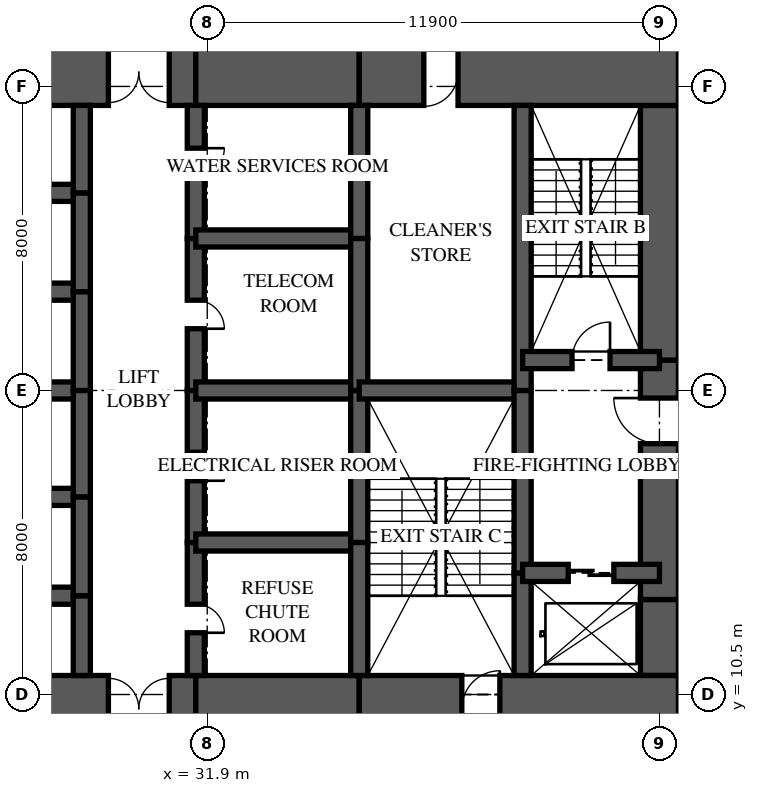
"""IFC4 building model, lengths in metres.
Left out: names, types, materials, properties, quantities, classifications, styles, units other than length and angle.
Written with IfcOpenShell. Run it as: python <this file> out.ifc"""

import sys

from ifc_helpers import new_model, si_unit, direction, frame, frame_2d, origin, place, context, subcontext, project, spatial, rectangle, extrude, element, fill, save


model = new_model("IFC4")
c1 = context("Model", 3, precision=1e-05, world=origin(), true_north=direction((0.0, 1.0)))
c2 = subcontext(c1, "Body", "Model", "MODEL_VIEW")
j1 = project(units=[si_unit("LENGTHUNIT", "METRE"), si_unit("PLANEANGLEUNIT", "RADIAN")], contexts=[c1])
p1 = place(None, origin())
s1 = spatial("IfcSite", under=j1, at=p1, CompositionType="ELEMENT")
p2 = place(p1, origin())
s2 = spatial("IfcBuilding", under=s1, at=p2, CompositionType="ELEMENT")
p3 = place(p2, frame((0.0, 0.0, -4.0)))
s3 = spatial("IfcBuildingStorey", under=s2, at=p3, CompositionType="ELEMENT", Elevation=-4.0)
p4 = place(p3, frame((26.0, 10.125, 0.0), z_axis=(0.0, 0.0, 1.0), x_axis=(1.0, 0.0, 0.0)))
e1 = element("IfcWall", 1, at=p4, inside=s3, PredefinedType="SHEAR", context=c2, shape_type="SweptSolid", body=[
    extrude(rectangle(XDim=5.6, YDim=1.75, at=frame_2d((2.8, 0.0))), origin(), (0.0, 0.0, 1.0), 4.0),
])
p5 = place(p4, frame((3.3, 0.0, 0.0)))
e2 = element("IfcOpeningElement", 2, at=p5, cuts=e1, PredefinedType="OPENING", context=c2, shape_type="SweptSolid", body=[
    extrude(rectangle(XDim=1.6, YDim=2.1, at=frame_2d((0.8, 1.05))), frame((0.0, 0.885, 0.0), z_axis=(0.0, -1.0, 0.0), x_axis=(1.0, 0.0, 0.0)), (0.0, 0.0, 1.0), 1.77),
])
p6 = place(p3, frame((31.6, 10.125, 0.0), z_axis=(0.0, 0.0, 1.0), x_axis=(1.0, 0.0, 0.0)))
e3 = element("IfcWall", 3, at=p6, inside=s3, PredefinedType="SHEAR", context=c2, shape_type="SweptSolid", body=[
    extrude(rectangle(XDim=4.3, YDim=1.75, at=frame_2d((2.15, 0.0))), origin(), (0.0, 0.0, 1.0), 4.0),
])
p7 = place(p3, frame((35.9, 10.125, 0.0), z_axis=(0.0, 0.0, 1.0), x_axis=(1.0, 0.0, 0.0)))
e4 = element("IfcWall", 4, at=p7, inside=s3, PredefinedType="SHEAR", context=c2, shape_type="SweptSolid", body=[
    extrude(rectangle(XDim=8.4, YDim=1.75, at=frame_2d((4.2, 0.0))), origin(), (0.0, 0.0, 1.0), 4.0),
])
p8 = place(p7, frame((2.7, 0.0, 0.0)))
e5 = element("IfcOpeningElement", 5, at=p8, cuts=e4, PredefinedType="OPENING", context=c2, shape_type="SweptSolid", body=[
    extrude(rectangle(XDim=1.0, YDim=2.1, at=frame_2d((0.5, 1.05))), frame((0.0, 0.885, 0.0), z_axis=(0.0, -1.0, 0.0), x_axis=(1.0, 0.0, 0.0)), (0.0, 0.0, 1.0), 1.77),
])
p9 = place(p3, frame((44.3, 26.875, 0.0), z_axis=(0.0, 0.0, 1.0), x_axis=(-1.0, 0.0, 0.0)))
e6 = element("IfcWall", 6, at=p9, inside=s3, PredefinedType="SHEAR", context=c2, shape_type="SweptSolid", body=[
    extrude(rectangle(XDim=8.4, YDim=1.75, at=frame_2d((4.2, 0.0))), origin(), (0.0, 0.0, 1.0), 4.0),
])
p10 = place(p9, frame((5.8, 0.0, 0.0)))
e7 = element("IfcOpeningElement", 7, at=p10, cuts=e6, PredefinedType="OPENING", context=c2, shape_type="SweptSolid", body=[
    extrude(rectangle(XDim=0.9, YDim=2.1, at=frame_2d((0.45, 1.05))), frame((0.0, 0.885, 0.0), z_axis=(0.0, -1.0, 0.0), x_axis=(1.0, 0.0, 0.0)), (0.0, 0.0, 1.0), 1.77),
])
p11 = place(p3, frame((35.9, 26.875, 0.0), z_axis=(0.0, 0.0, 1.0), x_axis=(-1.0, 0.0, 0.0)))
e8 = element("IfcWall", 8, at=p11, inside=s3, PredefinedType="SHEAR", context=c2, shape_type="SweptSolid", body=[
    extrude(rectangle(XDim=4.3, YDim=1.75, at=frame_2d((2.15, 0.0))), origin(), (0.0, 0.0, 1.0), 4.0),
])
p12 = place(p3, frame((31.6, 26.875, 0.0), z_axis=(0.0, 0.0, 1.0), x_axis=(-1.0, 0.0, 0.0)))
e9 = element("IfcWall", 9, at=p12, inside=s3, PredefinedType="SHEAR", context=c2, shape_type="SweptSolid", body=[
    extrude(rectangle(XDim=5.6, YDim=1.75, at=frame_2d((2.8, 0.0))), origin(), (0.0, 0.0, 1.0), 4.0),
])
p13 = place(p12, frame((0.7, 0.0, 0.0)))
e10 = element("IfcOpeningElement", 10, at=p13, cuts=e9, PredefinedType="OPENING", context=c2, shape_type="SweptSolid", body=[
    extrude(rectangle(XDim=1.6, YDim=2.1, at=frame_2d((0.8, 1.05))), frame((0.0, 0.885, 0.0), z_axis=(0.0, -1.0, 0.0), x_axis=(1.0, 0.0, 0.0)), (0.0, 0.0, 1.0), 1.77),
])
p14 = place(p3, frame((43.8, 11.0, 0.0), z_axis=(0.0, 0.0, 1.0), x_axis=(0.0, 1.0, 0.0)))
e11 = element("IfcWall", 11, at=p14, inside=s3, PredefinedType="SHEAR", context=c2, shape_type="SweptSolid", body=[
    extrude(rectangle(XDim=2.0, YDim=1.0, at=frame_2d((1.0, 0.0))), origin(), (0.0, 0.0, 1.0), 4.0),
])
p15 = place(p3, frame((43.8, 13.0, 0.0), z_axis=(0.0, 0.0, 1.0), x_axis=(0.0, 1.0, 0.0)))
e12 = element("IfcWall", 12, at=p15, inside=s3, PredefinedType="SHEAR", context=c2, shape_type="SweptSolid", body=[
    extrude(rectangle(XDim=6.3, YDim=1.0, at=frame_2d((3.15, 0.0))), origin(), (0.0, 0.0, 1.0), 4.0),
])
p16 = place(p15, frame((4.1, 0.0, 0.0)))
e13 = element("IfcOpeningElement", 13, at=p16, cuts=e12, PredefinedType="OPENING", context=c2, shape_type="SweptSolid", body=[
    extrude(rectangle(XDim=1.2, YDim=2.2, at=frame_2d((0.6, 1.1))), frame((0.0, 0.51, 0.0), z_axis=(0.0, -1.0, 0.0), x_axis=(1.0, 0.0, 0.0)), (0.0, 0.0, 1.0), 1.02),
])
p17 = place(p3, frame((43.8, 19.3, 0.0), z_axis=(0.0, 0.0, 1.0), x_axis=(0.0, 1.0, 0.0)))
e14 = element("IfcWall", 14, at=p17, inside=s3, PredefinedType="SHEAR", context=c2, shape_type="SweptSolid", body=[
    extrude(rectangle(XDim=6.7, YDim=1.0, at=frame_2d((3.35, 0.0))), origin(), (0.0, 0.0, 1.0), 4.0),
])
p18 = place(p3, frame((28.6, 11.0, 0.0), z_axis=(0.0, 0.0, 1.0), x_axis=(0.0, 1.0, 0.0)))
e15 = element("IfcWall", 15, at=p18, inside=s3, PredefinedType="SHEAR", context=c2, shape_type="SweptSolid", body=[
    extrude(rectangle(XDim=2.1, YDim=0.45, at=frame_2d((1.05, 0.0))), origin(), (0.0, 0.0, 1.0), 4.0),
])
p19 = place(p3, frame((28.6, 13.1, 0.0), z_axis=(0.0, 0.0, 1.0), x_axis=(0.0, 1.0, 0.0)))
e16 = element("IfcWall", 16, at=p19, inside=s3, PredefinedType="SHEAR", context=c2, shape_type="SweptSolid", body=[
    extrude(rectangle(XDim=2.6, YDim=0.45, at=frame_2d((1.3, 0.0))), origin(), (0.0, 0.0, 1.0), 4.0),
])
p20 = place(p3, frame((28.6, 15.7, 0.0), z_axis=(0.0, 0.0, 1.0), x_axis=(0.0, 1.0, 0.0)))
e17 = element("IfcWall", 17, at=p20, inside=s3, PredefinedType="SHEAR", context=c2, shape_type="SweptSolid", body=[
    extrude(rectangle(XDim=2.8, YDim=0.45, at=frame_2d((1.4, 0.0))), origin(), (0.0, 0.0, 1.0), 4.0),
])
p21 = place(p3, frame((28.6, 18.5, 0.0), z_axis=(0.0, 0.0, 1.0), x_axis=(0.0, 1.0, 0.0)))
e18 = element("IfcWall", 18, at=p21, inside=s3, PredefinedType="SHEAR", context=c2, shape_type="SweptSolid", body=[
    extrude(rectangle(XDim=2.6, YDim=0.45, at=frame_2d((1.3, 0.0))), origin(), (0.0, 0.0, 1.0), 4.0),
])
p22 = place(p3, frame((28.6, 21.1, 0.0), z_axis=(0.0, 0.0, 1.0), x_axis=(0.0, 1.0, 0.0)))
e19 = element("IfcWall", 19, at=p22, inside=s3, PredefinedType="SHEAR", context=c2, shape_type="SweptSolid", body=[
    extrude(rectangle(XDim=2.6, YDim=0.45, at=frame_2d((1.3, 0.0))), origin(), (0.0, 0.0, 1.0), 4.0),
])
p23 = place(p3, frame((28.6, 23.7, 0.0), z_axis=(0.0, 0.0, 1.0), x_axis=(0.0, 1.0, 0.0)))
e20 = element("IfcWall", 20, at=p23, inside=s3, PredefinedType="SHEAR", context=c2, shape_type="SweptSolid", body=[
    extrude(rectangle(XDim=2.3, YDim=0.45, at=frame_2d((1.15, 0.0))), origin(), (0.0, 0.0, 1.0), 4.0),
])
p24 = place(p3, frame((31.6, 11.0, 0.0), z_axis=(0.0, 0.0, 1.0), x_axis=(0.0, 1.0, 0.0)))
e21 = element("IfcWall", 21, at=p24, inside=s3, PredefinedType="SHEAR", context=c2, shape_type="SweptSolid", body=[
    extrude(rectangle(XDim=3.5, YDim=0.45, at=frame_2d((1.75, 0.0))), origin(), (0.0, 0.0, 1.0), 4.0),
])
p25 = place(p24, frame((1.125, 0.0, 0.0)))
e22 = element("IfcOpeningElement", 22, at=p25, cuts=e21, PredefinedType="OPENING", context=c2, shape_type="SweptSolid", body=[
    extrude(rectangle(XDim=0.75, YDim=2.1, at=frame_2d((0.375, 1.05))), frame((0.0, 0.235, 0.0), z_axis=(0.0, -1.0, 0.0), x_axis=(1.0, 0.0, 0.0)), (0.0, 0.0, 1.0), 0.47),
])
p26 = place(p3, frame((31.6, 14.5, 0.0), z_axis=(0.0, 0.0, 1.0), x_axis=(0.0, 1.0, 0.0)))
e23 = element("IfcWall", 23, at=p26, inside=s3, PredefinedType="SHEAR", context=c2, shape_type="SweptSolid", body=[
    extrude(rectangle(XDim=4.0, YDim=0.45, at=frame_2d((2.0, 0.0))), origin(), (0.0, 0.0, 1.0), 4.0),
])
p27 = place(p26, frame((1.625, 0.0, 0.0)))
e24 = element("IfcOpeningElement", 24, at=p27, cuts=e23, PredefinedType="OPENING", context=c2, shape_type="SweptSolid", body=[
    extrude(rectangle(XDim=0.75, YDim=2.1, at=frame_2d((0.375, 1.05))), frame((0.0, 0.235, 0.0), z_axis=(0.0, -1.0, 0.0), x_axis=(1.0, 0.0, 0.0)), (0.0, 0.0, 1.0), 0.47),
])
p28 = place(p3, frame((31.6, 18.5, 0.0), z_axis=(0.0, 0.0, 1.0), x_axis=(0.0, 1.0, 0.0)))
e25 = element("IfcWall", 25, at=p28, inside=s3, PredefinedType="SHEAR", context=c2, shape_type="SweptSolid", body=[
    extrude(rectangle(XDim=4.0, YDim=0.45, at=frame_2d((2.0, 0.0))), origin(), (0.0, 0.0, 1.0), 4.0),
])
p29 = place(p28, frame((1.625, 0.0, 0.0)))
e26 = element("IfcOpeningElement", 26, at=p29, cuts=e25, PredefinedType="OPENING", context=c2, shape_type="SweptSolid", body=[
    extrude(rectangle(XDim=0.75, YDim=2.1, at=frame_2d((0.375, 1.05))), frame((0.0, 0.235, 0.0), z_axis=(0.0, -1.0, 0.0), x_axis=(1.0, 0.0, 0.0)), (0.0, 0.0, 1.0), 0.47),
])
p30 = place(p3, frame((31.6, 22.5, 0.0), z_axis=(0.0, 0.0, 1.0), x_axis=(0.0, 1.0, 0.0)))
e27 = element("IfcWall", 27, at=p30, inside=s3, PredefinedType="SHEAR", context=c2, shape_type="SweptSolid", body=[
    extrude(rectangle(XDim=3.5, YDim=0.45, at=frame_2d((1.75, 0.0))), origin(), (0.0, 0.0, 1.0), 4.0),
])
p31 = place(p30, frame((1.625, 0.0, 0.0)))
e28 = element("IfcOpeningElement", 28, at=p31, cuts=e27, PredefinedType="OPENING", context=c2, shape_type="SweptSolid", body=[
    extrude(rectangle(XDim=0.75, YDim=2.1, at=frame_2d((0.375, 1.05))), frame((0.0, 0.235, 0.0), z_axis=(0.0, -1.0, 0.0), x_axis=(1.0, 0.0, 0.0)), (0.0, 0.0, 1.0), 0.47),
])
p32 = place(p3, frame((35.9, 11.0, 0.0), z_axis=(0.0, 0.0, 1.0), x_axis=(0.0, 1.0, 0.0)))
e29 = element("IfcWall", 29, at=p32, inside=s3, PredefinedType="SHEAR", context=c2, shape_type="SweptSolid", body=[
    extrude(rectangle(XDim=3.5, YDim=0.45, at=frame_2d((1.75, 0.0))), origin(), (0.0, 0.0, 1.0), 4.0),
])
for number, where, z_axis, x_axis in (
    (30, (35.9, 14.5, 0.0), (0.0, 0.0, 1.0), (0.0, 1.0, 0.0)),
    (31, (35.9, 18.5, 0.0), (0.0, 0.0, 1.0), (0.0, 1.0, 0.0)),
):
    element("IfcWall", number, at=place(p3, frame(where, z_axis=z_axis, x_axis=x_axis)), inside=s3, PredefinedType="SHEAR", context=c2, shape_type="SweptSolid", body=[
        extrude(rectangle(XDim=4.0, YDim=0.45, at=frame_2d((2.0, 0.0))), origin(), (0.0, 0.0, 1.0), 4.0),
    ])
p33 = place(p3, frame((35.9, 22.5, 0.0), z_axis=(0.0, 0.0, 1.0), x_axis=(0.0, 1.0, 0.0)))
e32 = element("IfcWall", 32, at=p33, inside=s3, PredefinedType="SHEAR", context=c2, shape_type="SweptSolid", body=[
    extrude(rectangle(XDim=3.5, YDim=0.45, at=frame_2d((1.75, 0.0))), origin(), (0.0, 0.0, 1.0), 4.0),
])
p34 = place(p3, frame((40.2, 11.0, 0.0), z_axis=(0.0, 0.0, 1.0), x_axis=(0.0, 1.0, 0.0)))
e33 = element("IfcWall", 33, at=p34, inside=s3, PredefinedType="SHEAR", context=c2, shape_type="SweptSolid", body=[
    extrude(rectangle(XDim=2.7, YDim=0.45, at=frame_2d((1.35, 0.0))), origin(), (0.0, 0.0, 1.0), 4.0),
])
p35 = place(p3, frame((40.2, 13.7, 0.0), z_axis=(0.0, 0.0, 1.0), x_axis=(0.0, 1.0, 0.0)))
e34 = element("IfcWall", 34, at=p35, inside=s3, PredefinedType="SHEAR", context=c2, shape_type="SweptSolid", body=[
    extrude(rectangle(XDim=4.8, YDim=0.45, at=frame_2d((2.4, 0.0))), origin(), (0.0, 0.0, 1.0), 4.0),
])
p36 = place(p3, frame((40.2, 18.5, 0.0), z_axis=(0.0, 0.0, 1.0), x_axis=(0.0, 1.0, 0.0)))
e35 = element("IfcWall", 35, at=p36, inside=s3, PredefinedType="SHEAR", context=c2, shape_type="SweptSolid", body=[
    extrude(rectangle(XDim=7.5, YDim=0.45, at=frame_2d((3.75, 0.0))), origin(), (0.0, 0.0, 1.0), 4.0),
])
for number, where, z_axis, x_axis in (
    (36, (26.0, 13.1, 0.0), (0.0, 0.0, 1.0), (1.0, 0.0, 0.0)),
    (37, (26.0, 15.7, 0.0), (0.0, 0.0, 1.0), (1.0, 0.0, 0.0)),
    (38, (26.0, 18.5, 0.0), (0.0, 0.0, 1.0), (1.0, 0.0, 0.0)),
    (39, (26.0, 21.1, 0.0), (0.0, 0.0, 1.0), (1.0, 0.0, 0.0)),
    (40, (26.0, 23.7, 0.0), (0.0, 0.0, 1.0), (1.0, 0.0, 0.0)),
):
    element("IfcWall", number, at=place(p3, frame(where, z_axis=z_axis, x_axis=x_axis)), inside=s3, PredefinedType="SHEAR", context=c2, shape_type="SweptSolid", body=[
        extrude(rectangle(XDim=2.6, YDim=0.45, at=frame_2d((1.3, 0.0))), origin(), (0.0, 0.0, 1.0), 4.0),
    ])
for number, where, z_axis, x_axis in (
    (41, (31.6, 14.5, 0.0), (0.0, 0.0, 1.0), (1.0, 0.0, 0.0)),
    (42, (31.6, 18.5, 0.0), (0.0, 0.0, 1.0), (1.0, 0.0, 0.0)),
    (43, (31.6, 22.5, 0.0), (0.0, 0.0, 1.0), (1.0, 0.0, 0.0)),
):
    element("IfcWall", number, at=place(p3, frame(where, z_axis=z_axis, x_axis=x_axis)), inside=s3, PredefinedType="SHEAR", context=c2, shape_type="SweptSolid", body=[
        extrude(rectangle(XDim=4.3, YDim=0.45, at=frame_2d((2.15, 0.0))), origin(), (0.0, 0.0, 1.0), 4.0),
    ])
p37 = place(p3, frame((35.9, 18.5, 0.0), z_axis=(0.0, 0.0, 1.0), x_axis=(1.0, 0.0, 0.0)))
e44 = element("IfcWall", 44, at=p37, inside=s3, PredefinedType="SHEAR", context=c2, shape_type="SweptSolid", body=[
    extrude(rectangle(XDim=4.3, YDim=0.45, at=frame_2d((2.15, 0.0))), origin(), (0.0, 0.0, 1.0), 4.0),
])
p38 = place(p3, frame((40.2, 13.7, 0.0), z_axis=(0.0, 0.0, 1.0), x_axis=(1.0, 0.0, 0.0)))
e45 = element("IfcWall", 45, at=p38, inside=s3, PredefinedType="SHEAR", context=c2, shape_type="SweptSolid", body=[
    extrude(rectangle(XDim=3.6, YDim=0.45, at=frame_2d((1.8, 0.0))), origin(), (0.0, 0.0, 1.0), 4.0),
])
p39 = place(p38, frame((1.2, 0.0, 0.0)))
e46 = element("IfcOpeningElement", 46, at=p39, cuts=e45, PredefinedType="OPENING", context=c2, shape_type="SweptSolid", body=[
    extrude(rectangle(XDim=1.2, YDim=2.1, at=frame_2d((0.6, 1.05))), frame((0.0, 0.235, 0.0), z_axis=(0.0, -1.0, 0.0), x_axis=(1.0, 0.0, 0.0)), (0.0, 0.0, 1.0), 0.47),
])
p40 = place(p3, frame((40.2, 19.3, 0.0), z_axis=(0.0, 0.0, 1.0), x_axis=(1.0, 0.0, 0.0)))
e47 = element("IfcWall", 47, at=p40, inside=s3, PredefinedType="SHEAR", context=c2, shape_type="SweptSolid", body=[
    extrude(rectangle(XDim=3.6, YDim=0.45, at=frame_2d((1.8, 0.0))), origin(), (0.0, 0.0, 1.0), 4.0),
])
p41 = place(p40, frame((1.3, 0.0, 0.0)))
e48 = element("IfcOpeningElement", 48, at=p41, cuts=e47, PredefinedType="OPENING", context=c2, shape_type="SweptSolid", body=[
    extrude(rectangle(XDim=1.0, YDim=2.1, at=frame_2d((0.5, 1.05))), frame((0.0, 0.235, 0.0), z_axis=(0.0, -1.0, 0.0), x_axis=(1.0, 0.0, 0.0)), (0.0, 0.0, 1.0), 0.47),
])
p42 = place(p41, origin())
e49 = element("IfcDoor", 49, at=p42, inside=s3, OperationType="SINGLE_SWING_RIGHT", PredefinedType="DOOR", context=c2, shape_type="SweptSolid", body=[
    extrude(rectangle(XDim=1.0, YDim=2.1, at=frame_2d((0.5, 1.05))), frame((0.0, 0.025, 0.0), z_axis=(0.0, -1.0, 0.0), x_axis=(1.0, 0.0, 0.0)), (0.0, 0.0, 1.0), 0.05),
])
fill(e48, e49)
p43 = place(p16, origin())
e50 = element("IfcDoor", 50, at=p43, inside=s3, OperationType="SINGLE_SWING_RIGHT", PredefinedType="DOOR", context=c2, shape_type="SweptSolid", body=[
    extrude(rectangle(XDim=1.2, YDim=2.2, at=frame_2d((0.6, 1.1))), frame((0.0, 0.025, 0.0), z_axis=(0.0, -1.0, 0.0), x_axis=(1.0, 0.0, 0.0)), (0.0, 0.0, 1.0), 0.05),
])
fill(e13, e50)
p44 = place(p39, origin())
e51 = element("IfcDoor", 51, at=p44, inside=s3, OperationType="SLIDING_TO_LEFT", PredefinedType="DOOR", context=c2, shape_type="SweptSolid", body=[
    extrude(rectangle(XDim=1.2, YDim=2.1, at=frame_2d((0.6, 1.05))), frame((0.0, 0.025, 0.0), z_axis=(0.0, -1.0, 0.0), x_axis=(1.0, 0.0, 0.0)), (0.0, 0.0, 1.0), 0.05),
])
fill(e46, e51)
p45 = place(p5, origin())
e52 = element("IfcDoor", 52, at=p45, inside=s3, OperationType="DOUBLE_DOOR_SINGLE_SWING", PredefinedType="DOOR", context=c2, shape_type="SweptSolid", body=[
    extrude(rectangle(XDim=1.6, YDim=2.1, at=frame_2d((0.8, 1.05))), frame((0.0, 0.025, 0.0), z_axis=(0.0, -1.0, 0.0), x_axis=(1.0, 0.0, 0.0)), (0.0, 0.0, 1.0), 0.05),
])
fill(e2, e52)
p46 = place(p13, origin())
e53 = element("IfcDoor", 53, at=p46, inside=s3, OperationType="DOUBLE_DOOR_SINGLE_SWING", PredefinedType="DOOR", context=c2, shape_type="SweptSolid", body=[
    extrude(rectangle(XDim=1.6, YDim=2.1, at=frame_2d((0.8, 1.05))), frame((0.0, 0.025, 0.0), z_axis=(0.0, -1.0, 0.0), x_axis=(1.0, 0.0, 0.0)), (0.0, 0.0, 1.0), 0.05),
])
fill(e10, e53)
p47 = place(p25, frame((0.75, 0.0, 0.0), z_axis=(0.0, 0.0, 1.0), x_axis=(-1.0, 0.0, 0.0)))
e54 = element("IfcDoor", 54, at=p47, inside=s3, OperationType="SINGLE_SWING_RIGHT", PredefinedType="DOOR", context=c2, shape_type="SweptSolid", body=[
    extrude(rectangle(XDim=0.75, YDim=2.1, at=frame_2d((0.375, 1.05))), frame((0.0, 0.025, 0.0), z_axis=(0.0, -1.0, 0.0), x_axis=(1.0, 0.0, 0.0)), (0.0, 0.0, 1.0), 0.05),
])
fill(e22, e54)
p48 = place(p27, frame((0.75, 0.0, 0.0), z_axis=(0.0, 0.0, 1.0), x_axis=(-1.0, 0.0, 0.0)))
e55 = element("IfcDoor", 55, at=p48, inside=s3, OperationType="SINGLE_SWING_RIGHT", PredefinedType="DOOR", context=c2, shape_type="SweptSolid", body=[
    extrude(rectangle(XDim=0.75, YDim=2.1, at=frame_2d((0.375, 1.05))), frame((0.0, 0.025, 0.0), z_axis=(0.0, -1.0, 0.0), x_axis=(1.0, 0.0, 0.0)), (0.0, 0.0, 1.0), 0.05),
])
fill(e24, e55)
p49 = place(p29, frame((0.75, 0.0, 0.0), z_axis=(0.0, 0.0, 1.0), x_axis=(-1.0, 0.0, 0.0)))
e56 = element("IfcDoor", 56, at=p49, inside=s3, OperationType="SINGLE_SWING_RIGHT", PredefinedType="DOOR", context=c2, shape_type="SweptSolid", body=[
    extrude(rectangle(XDim=0.75, YDim=2.1, at=frame_2d((0.375, 1.05))), frame((0.0, 0.025, 0.0), z_axis=(0.0, -1.0, 0.0), x_axis=(1.0, 0.0, 0.0)), (0.0, 0.0, 1.0), 0.05),
])
fill(e26, e56)
p50 = place(p31, frame((0.75, 0.0, 0.0), z_axis=(0.0, 0.0, 1.0), x_axis=(-1.0, 0.0, 0.0)))
e57 = element("IfcDoor", 57, at=p50, inside=s3, OperationType="SINGLE_SWING_LEFT", PredefinedType="DOOR", context=c2, shape_type="SweptSolid", body=[
    extrude(rectangle(XDim=0.75, YDim=2.1, at=frame_2d((0.375, 1.05))), frame((0.0, 0.025, 0.0), z_axis=(0.0, -1.0, 0.0), x_axis=(1.0, 0.0, 0.0)), (0.0, 0.0, 1.0), 0.05),
])
fill(e28, e57)
p51 = place(p8, origin())
e58 = element("IfcDoor", 58, at=p51, inside=s3, OperationType="SINGLE_SWING_RIGHT", PredefinedType="DOOR", context=c2, shape_type="SweptSolid", body=[
    extrude(rectangle(XDim=1.0, YDim=2.1, at=frame_2d((0.5, 1.05))), frame((0.0, 0.025, 0.0), z_axis=(0.0, -1.0, 0.0), x_axis=(1.0, 0.0, 0.0)), (0.0, 0.0, 1.0), 0.05),
])
fill(e5, e58)
p52 = place(p10, origin())
e59 = element("IfcDoor", 59, at=p52, inside=s3, OperationType="SINGLE_SWING_RIGHT", PredefinedType="DOOR", context=c2, shape_type="SweptSolid", body=[
    extrude(rectangle(XDim=0.9, YDim=2.1, at=frame_2d((0.45, 1.05))), frame((0.0, 0.47, 0.0), z_axis=(0.0, -1.0, 0.0), x_axis=(1.0, 0.0, 0.0)), (0.0, 0.0, 1.0), 0.8),
])
fill(e7, e59)
save(model, sys.argv[1])
